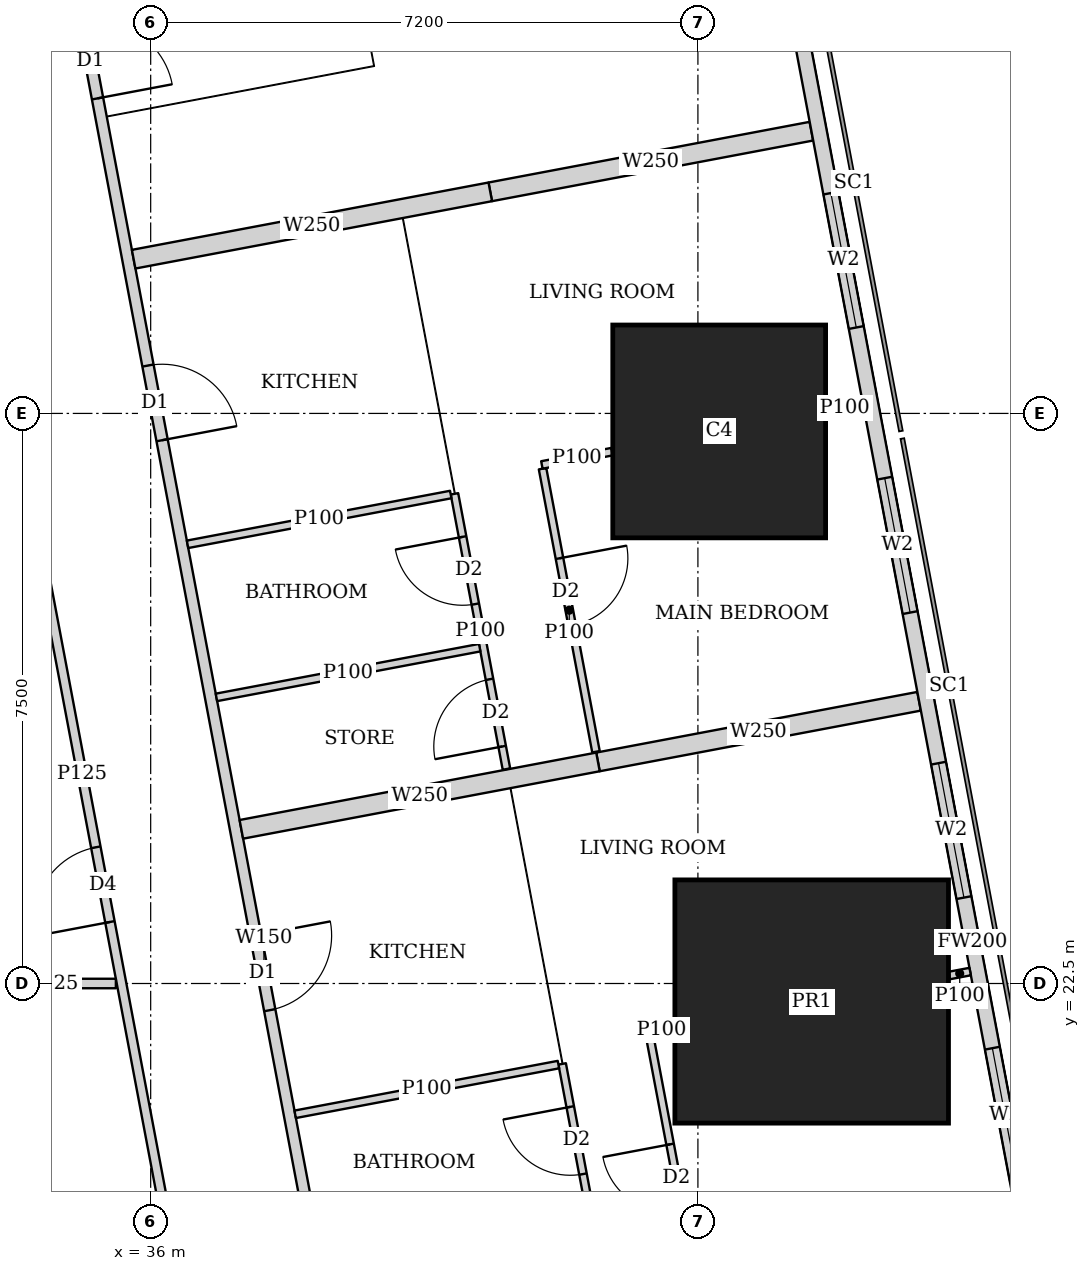
"""IFC4 building model, lengths in metres.
Left out: names, types, materials, properties, quantities, classifications, styles, units other than length and angle.
Written with IfcOpenShell. Run it as: python <this file> out.ifc"""

import sys

from ifc_helpers import new_model, si_unit, direction, frame, frame_2d, origin, origin_2d, place, context, subcontext, project, spatial, rectangle, extrude, element, fill, save


model = new_model("IFC4")
c1 = context("Model", 3, precision=1e-05, world=origin(), true_north=direction((0.0, 1.0)))
c2 = subcontext(c1, "Body", "Model", "MODEL_VIEW")
j1 = project(units=[si_unit("LENGTHUNIT", "METRE"), si_unit("PLANEANGLEUNIT", "RADIAN")], contexts=[c1])
p1 = place(None, origin())
s1 = spatial("IfcSite", under=j1, at=p1, CompositionType="ELEMENT")
p2 = place(p1, origin())
s2 = spatial("IfcBuilding", under=s1, at=p2, CompositionType="ELEMENT")
p3 = place(p2, frame((0.0, 0.0, 42.5)))
s3 = spatial("IfcBuildingStorey", under=s2, at=p3, CompositionType="ELEMENT", Elevation=42.5)
p4 = place(p3, frame((44.697, 22.263, 0.0), z_axis=(0.0, 0.0, 1.0), x_axis=(1.0, 0.0, 0.0)))
e1 = element("IfcColumn", 1, at=p4, inside=s3, PredefinedType="COLUMN", context=c2, shape_type="SweptSolid", body=[
    extrude(rectangle(XDim=3.6, YDim=3.2, at=origin_2d()), origin(), (0.0, 0.0, 1.0), 3.75),
])
p5 = place(p3, frame((43.48, 29.763, 0.0), z_axis=(0.0, 0.0, 1.0), x_axis=(1.0, 0.0, 0.0)))
e2 = element("IfcColumn", 2, at=p5, inside=s3, PredefinedType="COLUMN", context=c2, shape_type="SweptSolid", body=[
    extrude(rectangle(XDim=2.8, YDim=2.8, at=origin_2d()), origin(), (0.0, 0.0, 1.0), 3.75),
])
p6 = place(p3, frame((50.653, 2.703, 0.0), z_axis=(0.0, 0.0, 1.0), x_axis=(-0.185612026696, 0.982623109613, 0.0)))
e3 = element("IfcWall", 3, at=p6, inside=s3, PredefinedType="SOLIDWALL", context=c2, shape_type="SweptSolid", body=[
    extrude(rectangle(XDim=41.393, YDim=0.2, at=frame_2d((20.697, 0.0))), origin(), (0.0, 0.0, 1.0), 3.5),
])
p7 = place(p6, frame((1.633, 0.0, 0.9)))
e4 = element("IfcOpeningElement", 4, at=p7, cuts=e3, PredefinedType="OPENING", context=c2, shape_type="SweptSolid", body=[
    extrude(rectangle(XDim=1.8, YDim=1.5, at=frame_2d((0.9, 0.75))), frame((0.0, 0.11, 0.0), z_axis=(0.0, -1.0, 0.0), x_axis=(1.0, 0.0, 0.0)), (0.0, 0.0, 1.0), 0.22),
])
p8 = place(p6, frame((6.032, 0.0, 0.9)))
e5 = element("IfcOpeningElement", 5, at=p8, cuts=e3, PredefinedType="OPENING", context=c2, shape_type="SweptSolid", body=[
    extrude(rectangle(XDim=1.8, YDim=1.5, at=frame_2d((0.9, 0.75))), frame((0.0, 0.11, 0.0), z_axis=(0.0, -1.0, 0.0), x_axis=(1.0, 0.0, 0.0)), (0.0, 0.0, 1.0), 0.22),
])
p9 = place(p6, frame((9.848, 0.0, 0.9)))
e6 = element("IfcOpeningElement", 6, at=p9, cuts=e3, PredefinedType="OPENING", context=c2, shape_type="SweptSolid", body=[
    extrude(rectangle(XDim=1.8, YDim=1.5, at=frame_2d((0.9, 0.75))), frame((0.0, 0.11, 0.0), z_axis=(0.0, -1.0, 0.0), x_axis=(1.0, 0.0, 0.0)), (0.0, 0.0, 1.0), 0.22),
])
p10 = place(p6, frame((17.481, 0.0, 0.9)))
e7 = element("IfcOpeningElement", 7, at=p10, cuts=e3, PredefinedType="OPENING", context=c2, shape_type="SweptSolid", body=[
    extrude(rectangle(XDim=1.8, YDim=1.5, at=frame_2d((0.9, 0.75))), frame((0.0, 0.11, 0.0), z_axis=(0.0, -1.0, 0.0), x_axis=(1.0, 0.0, 0.0)), (0.0, 0.0, 1.0), 0.22),
])
p11 = place(p6, frame((21.297, 0.0, 0.9)))
e8 = element("IfcOpeningElement", 8, at=p11, cuts=e3, PredefinedType="OPENING", context=c2, shape_type="SweptSolid", body=[
    extrude(rectangle(XDim=1.8, YDim=1.5, at=frame_2d((0.9, 0.75))), frame((0.0, 0.11, 0.0), z_axis=(0.0, -1.0, 0.0), x_axis=(1.0, 0.0, 0.0)), (0.0, 0.0, 1.0), 0.22),
])
p12 = place(p6, frame((25.113, 0.0, 0.9)))
e9 = element("IfcOpeningElement", 9, at=p12, cuts=e3, PredefinedType="OPENING", context=c2, shape_type="SweptSolid", body=[
    extrude(rectangle(XDim=1.8, YDim=1.5, at=frame_2d((0.9, 0.75))), frame((0.0, 0.11, 0.0), z_axis=(0.0, -1.0, 0.0), x_axis=(1.0, 0.0, 0.0)), (0.0, 0.0, 1.0), 0.22),
])
p13 = place(p6, frame((28.93, 0.0, 0.9)))
e10 = element("IfcOpeningElement", 10, at=p13, cuts=e3, PredefinedType="OPENING", context=c2, shape_type="SweptSolid", body=[
    extrude(rectangle(XDim=1.8, YDim=1.5, at=frame_2d((0.9, 0.75))), frame((0.0, 0.11, 0.0), z_axis=(0.0, -1.0, 0.0), x_axis=(1.0, 0.0, 0.0)), (0.0, 0.0, 1.0), 0.22),
])
p14 = place(p6, frame((32.746, 0.0, 0.9)))
e11 = element("IfcOpeningElement", 11, at=p14, cuts=e3, PredefinedType="OPENING", context=c2, shape_type="SweptSolid", body=[
    extrude(rectangle(XDim=1.8, YDim=1.5, at=frame_2d((0.9, 0.75))), frame((0.0, 0.11, 0.0), z_axis=(0.0, -1.0, 0.0), x_axis=(1.0, 0.0, 0.0)), (0.0, 0.0, 1.0), 0.22),
])
p15 = place(p6, frame((36.481, 0.0, 0.9)))
e12 = element("IfcOpeningElement", 12, at=p15, cuts=e3, PredefinedType="OPENING", context=c2, shape_type="SweptSolid", body=[
    extrude(rectangle(XDim=1.8, YDim=1.5, at=frame_2d((0.9, 0.75))), frame((0.0, 0.11, 0.0), z_axis=(0.0, -1.0, 0.0), x_axis=(1.0, 0.0, 0.0)), (0.0, 0.0, 1.0), 0.22),
])
p16 = place(p3, frame((33.68, 42.723, 0.0), z_axis=(0.0, 0.0, 1.0), x_axis=(0.185624129307, -0.98262082342, 0.0)))
e13 = element("IfcWall", 13, at=p16, inside=s3, PredefinedType="SOLIDWALL", context=c2, shape_type="SweptSolid", body=[
    extrude(rectangle(XDim=41.051, YDim=0.15, at=frame_2d((20.526, 0.0))), origin(), (0.0, 0.0, 1.0), 2.5),
])
p17 = place(p16, frame((7.73, 0.0, 0.0)))
e14 = element("IfcOpeningElement", 14, at=p17, cuts=e13, PredefinedType="OPENING", context=c2, shape_type="SweptSolid", body=[
    extrude(rectangle(XDim=1.0, YDim=2.1, at=frame_2d((0.5, 1.05))), frame((0.0, 0.085, 0.0), z_axis=(0.0, -1.0, 0.0), x_axis=(1.0, 0.0, 0.0)), (0.0, 0.0, 1.0), 0.17),
])
p18 = place(p16, frame((12.307, 0.0, 0.0)))
e15 = element("IfcOpeningElement", 15, at=p18, cuts=e13, PredefinedType="OPENING", context=c2, shape_type="SweptSolid", body=[
    extrude(rectangle(XDim=1.0, YDim=2.1, at=frame_2d((0.5, 1.05))), frame((0.0, 0.085, 0.0), z_axis=(0.0, -1.0, 0.0), x_axis=(1.0, 0.0, 0.0)), (0.0, 0.0, 1.0), 0.17),
])
p19 = place(p16, frame((19.938, 0.0, 0.0)))
e16 = element("IfcOpeningElement", 16, at=p19, cuts=e13, PredefinedType="OPENING", context=c2, shape_type="SweptSolid", body=[
    extrude(rectangle(XDim=1.0, YDim=2.1, at=frame_2d((0.5, 1.05))), frame((0.0, 0.085, 0.0), z_axis=(0.0, -1.0, 0.0), x_axis=(1.0, 0.0, 0.0)), (0.0, 0.0, 1.0), 0.17),
])
p20 = place(p16, frame((32.193, 0.0, 0.0)))
e17 = element("IfcOpeningElement", 17, at=p20, cuts=e13, PredefinedType="OPENING", context=c2, shape_type="SweptSolid", body=[
    extrude(rectangle(XDim=1.0, YDim=2.1, at=frame_2d((0.5, 1.05))), frame((0.0, 0.085, 0.0), z_axis=(0.0, -1.0, 0.0), x_axis=(1.0, 0.0, 0.0)), (0.0, 0.0, 1.0), 0.17),
])
p21 = place(p3, frame((41.156, 29.273, 0.0), z_axis=(0.0, 0.0, 1.0), x_axis=(0.185474762472, -0.982649028131, 0.0)))
e18 = element("IfcWall", 18, at=p21, inside=s3, PredefinedType="PARTITIONING", context=c2, shape_type="SweptSolid", body=[
    extrude(rectangle(XDim=3.79, YDim=0.1, at=frame_2d((1.895, 0.0))), origin(), (0.0, 0.0, 1.0), 2.5),
])
p22 = place(p21, frame((1.2, 0.0, 0.0)))
e19 = element("IfcOpeningElement", 19, at=p22, cuts=e18, PredefinedType="OPENING", context=c2, shape_type="SweptSolid", body=[
    extrude(rectangle(XDim=0.9, YDim=2.1, at=frame_2d((0.45, 1.05))), frame((0.0, 0.06, 0.0), z_axis=(0.0, -1.0, 0.0), x_axis=(1.0, 0.0, 0.0)), (0.0, 0.0, 1.0), 0.12),
])
p23 = place(p3, frame((39.997, 28.942, 0.0), z_axis=(0.0, 0.0, 1.0), x_axis=(0.185580474845, -0.982629069057, 0.0)))
e20 = element("IfcWall", 20, at=p23, inside=s3, PredefinedType="PARTITIONING", context=c2, shape_type="SweptSolid", body=[
    extrude(rectangle(XDim=3.685, YDim=0.1, at=frame_2d((1.842, 0.0))), origin(), (0.0, 0.0, 1.0), 3.5),
])
p24 = place(p23, frame((0.576, 0.0, 0.0)))
e21 = element("IfcOpeningElement", 21, at=p24, cuts=e20, PredefinedType="OPENING", context=c2, shape_type="SweptSolid", body=[
    extrude(rectangle(XDim=0.9, YDim=2.1, at=frame_2d((0.45, 1.05))), frame((0.0, 0.06, 0.0), z_axis=(0.0, -1.0, 0.0), x_axis=(1.0, 0.0, 0.0)), (0.0, 0.0, 1.0), 0.12),
])
p25 = place(p23, frame((2.483, 0.0, 0.0)))
e22 = element("IfcOpeningElement", 22, at=p25, cuts=e20, PredefinedType="OPENING", context=c2, shape_type="SweptSolid", body=[
    extrude(rectangle(XDim=0.9, YDim=2.1, at=frame_2d((0.45, 1.05))), frame((0.0, 0.06, 0.0), z_axis=(0.0, -1.0, 0.0), x_axis=(1.0, 0.0, 0.0)), (0.0, 0.0, 1.0), 0.12),
])
p26 = place(p3, frame((45.372, 30.121, 0.0), z_axis=(0.0, 0.0, 1.0), x_axis=(-0.982629142467, -0.185580086147, 0.0)))
e23 = element("IfcWall", 23, at=p26, inside=s3, PredefinedType="PARTITIONING", context=c2, shape_type="SweptSolid", body=[
    extrude(rectangle(XDim=0.491, YDim=0.1, at=frame_2d((0.245, 0.0))), origin(), (0.0, 0.0, 1.0), 3.5),
])
p27 = place(p3, frame((42.07, 29.497, 0.0), z_axis=(0.0, 0.0, 1.0), x_axis=(-0.982490624992, -0.186312028067, 0.0)))
e24 = element("IfcWall", 24, at=p27, inside=s3, PredefinedType="PARTITIONING", context=c2, shape_type="SweptSolid", body=[
    extrude(rectangle(XDim=0.939, YDim=0.1, at=frame_2d((0.47, 0.0))), origin(), (0.0, 0.0, 1.0), 2.5),
])
p28 = place(p3, frame((39.948, 28.933, 0.0), z_axis=(0.0, 0.0, 1.0), x_axis=(-0.982576058723, -0.185860939478, 0.0)))
e25 = element("IfcWall", 25, at=p28, inside=s3, PredefinedType="PARTITIONING", context=c2, shape_type="SweptSolid", body=[
    extrude(rectangle(XDim=3.524, YDim=0.1, at=frame_2d((1.762, 0.0))), origin(), (0.0, 0.0, 1.0), 3.5),
])
p29 = place(p3, frame((40.329, 26.918, 0.0), z_axis=(0.0, 0.0, 1.0), x_axis=(-0.982638553676, -0.185530247748, 0.0)))
e26 = element("IfcWall", 26, at=p29, inside=s3, PredefinedType="PARTITIONING", context=c2, shape_type="SweptSolid", body=[
    extrude(rectangle(XDim=3.525, YDim=0.1, at=frame_2d((1.763, 0.0))), origin(), (0.0, 0.0, 1.0), 3.5),
])
p30 = place(p3, frame((44.693, 33.713, 0.0), z_axis=(0.0, 0.0, 1.0), x_axis=(-0.982633535512, -0.185556823879, 0.0)))
e27 = element("IfcWall", 27, at=p30, inside=s3, PredefinedType="SOLIDWALL", context=c2, shape_type="SweptSolid", body=[
    extrude(rectangle(XDim=4.3, YDim=0.25, at=frame_2d((2.15, 0.0))), origin(), (0.0, 0.0, 1.0), 2.05),
])
p31 = place(p3, frame((40.468, 32.915, 0.0), z_axis=(0.0, 0.0, 1.0), x_axis=(-0.982635807605, -0.185544791394, 0.0)))
e28 = element("IfcWall", 28, at=p31, inside=s3, PredefinedType="SOLIDWALL", context=c2, shape_type="SweptSolid", body=[
    extrude(rectangle(XDim=4.775, YDim=0.25, at=frame_2d((2.388, 0.0))), origin(), (0.0, 0.0, 1.0), 3.5),
])
p32 = place(p3, frame((42.565, 21.809, 0.0), z_axis=(0.0, 0.0, 1.0), x_axis=(0.185719768524, -0.982602751665, 0.0)))
e29 = element("IfcWall", 29, at=p32, inside=s3, PredefinedType="PARTITIONING", context=c2, shape_type="SweptSolid", body=[
    extrude(rectangle(XDim=6.004, YDim=0.1, at=frame_2d((3.002, 0.0))), origin(), (0.0, 0.0, 1.0), 2.5),
])
p33 = place(p32, frame((1.45, 0.0, 0.0)))
e30 = element("IfcOpeningElement", 30, at=p33, cuts=e29, PredefinedType="OPENING", context=c2, shape_type="SweptSolid", body=[
    extrude(rectangle(XDim=0.9, YDim=2.1, at=frame_2d((0.45, 1.05))), frame((0.0, 0.06, 0.0), z_axis=(0.0, -1.0, 0.0), x_axis=(1.0, 0.0, 0.0)), (0.0, 0.0, 1.0), 0.12),
])
p34 = place(p3, frame((41.414, 21.442, 0.0), z_axis=(0.0, 0.0, 1.0), x_axis=(0.185605379031, -0.982624365297, 0.0)))
e31 = element("IfcWall", 31, at=p34, inside=s3, PredefinedType="PARTITIONING", context=c2, shape_type="SweptSolid", body=[
    extrude(rectangle(XDim=5.63, YDim=0.1, at=frame_2d((2.815, 0.0))), origin(), (0.0, 0.0, 1.0), 3.5),
])
p35 = place(p34, frame((0.575, 0.0, 0.0)))
e32 = element("IfcOpeningElement", 32, at=p35, cuts=e31, PredefinedType="OPENING", context=c2, shape_type="SweptSolid", body=[
    extrude(rectangle(XDim=0.9, YDim=2.1, at=frame_2d((0.45, 1.05))), frame((0.0, 0.06, 0.0), z_axis=(0.0, -1.0, 0.0), x_axis=(1.0, 0.0, 0.0)), (0.0, 0.0, 1.0), 0.12),
])
p36 = place(p34, frame((4.58, 0.0, 0.0)))
e33 = element("IfcOpeningElement", 33, at=p36, cuts=e31, PredefinedType="OPENING", context=c2, shape_type="SweptSolid", body=[
    extrude(rectangle(XDim=0.9, YDim=2.1, at=frame_2d((0.45, 1.05))), frame((0.0, 0.06, 0.0), z_axis=(0.0, -1.0, 0.0), x_axis=(1.0, 0.0, 0.0)), (0.0, 0.0, 1.0), 0.12),
])
p37 = place(p34, frame((2.483, 0.0, 0.0)))
e34 = element("IfcOpeningElement", 34, at=p37, cuts=e31, PredefinedType="OPENING", context=c2, shape_type="SweptSolid", body=[
    extrude(rectangle(XDim=0.9, YDim=2.1, at=frame_2d((0.45, 1.05))), frame((0.0, 0.06, 0.0), z_axis=(0.0, -1.0, 0.0), x_axis=(1.0, 0.0, 0.0)), (0.0, 0.0, 1.0), 0.12),
])
p38 = place(p3, frame((46.782, 22.657, 0.0), z_axis=(0.0, 0.0, 1.0), x_axis=(-0.982574553168, -0.185868898601, 0.0)))
e35 = element("IfcWall", 35, at=p38, inside=s3, PredefinedType="PARTITIONING", context=c2, shape_type="SweptSolid", body=[
    extrude(rectangle(XDim=0.28, YDim=0.1, at=frame_2d((0.14, 0.0))), origin(), (0.0, 0.0, 1.0), 3.5),
])
p39 = place(p3, frame((42.887, 21.921, 0.0), z_axis=(0.0, 0.0, 1.0), x_axis=(-0.982274918032, -0.187445953293, 0.0)))
e36 = element("IfcWall", 36, at=p39, inside=s3, PredefinedType="PARTITIONING", context=c2, shape_type="SweptSolid", body=[
    extrude(rectangle(XDim=0.336, YDim=0.1, at=frame_2d((0.168, 0.0))), origin(), (0.0, 0.0, 1.0), 2.5),
])
p40 = place(p3, frame((41.365, 21.433, 0.0), z_axis=(0.0, 0.0, 1.0), x_axis=(-0.982638553676, -0.185530247748, 0.0)))
e37 = element("IfcWall", 37, at=p40, inside=s3, PredefinedType="PARTITIONING", context=c2, shape_type="SweptSolid", body=[
    extrude(rectangle(XDim=3.525, YDim=0.1, at=frame_2d((1.763, 0.0))), origin(), (0.0, 0.0, 1.0), 3.5),
])
p41 = place(p3, frame((46.11, 26.213, 0.0), z_axis=(0.0, 0.0, 1.0), x_axis=(-0.982633535512, -0.185556823879, 0.0)))
e38 = element("IfcWall", 38, at=p41, inside=s3, PredefinedType="SOLIDWALL", context=c2, shape_type="SweptSolid", body=[
    extrude(rectangle(XDim=4.3, YDim=0.25, at=frame_2d((2.15, 0.0))), origin(), (0.0, 0.0, 1.0), 2.05),
])
p42 = place(p3, frame((41.885, 25.415, 0.0), z_axis=(0.0, 0.0, 1.0), x_axis=(-0.982596737686, -0.185751584349, 0.0)))
e39 = element("IfcWall", 39, at=p42, inside=s3, PredefinedType="SOLIDWALL", context=c2, shape_type="SweptSolid", body=[
    extrude(rectangle(XDim=4.775, YDim=0.25, at=frame_2d((2.387, 0.0))), origin(), (0.0, 0.0, 1.0), 3.5),
])
p43 = place(p3, frame((36.861, 15.913, 0.0), z_axis=(0.0, 0.0, 1.0), x_axis=(-0.185588307143, 0.982627589808, 0.0)))
e40 = element("IfcWall", 40, at=p43, inside=s3, PredefinedType="PARTITIONING", context=c2, shape_type="SweptSolid", body=[
    extrude(rectangle(XDim=19.005, YDim=0.125, at=frame_2d((9.502, 0.0))), origin(), (0.0, 0.0, 1.0), 2.5),
])
p44 = place(p43, frame((0.25, 0.0, 0.0)))
e41 = element("IfcOpeningElement", 41, at=p44, cuts=e40, PredefinedType="OPENING", context=c2, shape_type="SweptSolid", body=[
    extrude(rectangle(XDim=1.0, YDim=2.1, at=frame_2d((0.5, 1.05))), frame((0.0, 0.073, 0.0), z_axis=(0.0, -1.0, 0.0), x_axis=(1.0, 0.0, 0.0)), (0.0, 0.0, 1.0), 0.145),
])
p45 = place(p43, frame((7.527, 0.0, 0.0)))
e42 = element("IfcOpeningElement", 42, at=p45, cuts=e40, PredefinedType="OPENING", context=c2, shape_type="SweptSolid", body=[
    extrude(rectangle(XDim=1.0, YDim=2.1, at=frame_2d((0.5, 1.05))), frame((0.0, 0.073, 0.0), z_axis=(0.0, -1.0, 0.0), x_axis=(1.0, 0.0, 0.0)), (0.0, 0.0, 1.0), 0.145),
])
p46 = place(p43, frame((15.5, 0.0, 0.0)))
e43 = element("IfcOpeningElement", 43, at=p46, cuts=e40, PredefinedType="OPENING", context=c2, shape_type="SweptSolid", body=[
    extrude(rectangle(XDim=1.0, YDim=2.1, at=frame_2d((0.5, 1.05))), frame((0.0, 0.073, 0.0), z_axis=(0.0, -1.0, 0.0), x_axis=(1.0, 0.0, 0.0)), (0.0, 0.0, 1.0), 0.145),
])
p47 = place(p3, frame((33.901, 22.5, 0.0), z_axis=(0.0, 0.0, 1.0), x_axis=(1.0, 0.0, 0.0)))
e44 = element("IfcWall", 44, at=p47, inside=s3, PredefinedType="PARTITIONING", context=c2, shape_type="SweptSolid", body=[
    extrude(rectangle(XDim=1.641, YDim=0.125, at=frame_2d((0.821, 0.0))), origin(), (0.0, 0.0, 1.0), 2.5),
])
p48 = place(p10, origin())
e45 = element("IfcWindow", 45, at=p48, inside=s3, PartitioningType="SINGLE_PANEL", PredefinedType="WINDOW", context=c2, shape_type="SweptSolid", body=[
    extrude(rectangle(XDim=1.8, YDim=1.5, at=frame_2d((0.9, 0.75))), frame((0.0, 0.03, 0.0), z_axis=(0.0, -1.0, 0.0), x_axis=(1.0, 0.0, 0.0)), (0.0, 0.0, 1.0), 0.06),
])
fill(e7, e45)
p49 = place(p11, origin())
e46 = element("IfcWindow", 46, at=p49, inside=s3, PartitioningType="SINGLE_PANEL", PredefinedType="WINDOW", context=c2, shape_type="SweptSolid", body=[
    extrude(rectangle(XDim=1.8, YDim=1.5, at=frame_2d((0.9, 0.75))), frame((0.0, 0.03, 0.0), z_axis=(0.0, -1.0, 0.0), x_axis=(1.0, 0.0, 0.0)), (0.0, 0.0, 1.0), 0.06),
])
fill(e8, e46)
p50 = place(p12, origin())
e47 = element("IfcWindow", 47, at=p50, inside=s3, PartitioningType="SINGLE_PANEL", PredefinedType="WINDOW", context=c2, shape_type="SweptSolid", body=[
    extrude(rectangle(XDim=1.8, YDim=1.5, at=frame_2d((0.9, 0.75))), frame((0.0, 0.03, 0.0), z_axis=(0.0, -1.0, 0.0), x_axis=(1.0, 0.0, 0.0)), (0.0, 0.0, 1.0), 0.06),
])
fill(e9, e47)
p51 = place(p13, origin())
e48 = element("IfcWindow", 48, at=p51, inside=s3, PartitioningType="SINGLE_PANEL", PredefinedType="WINDOW", context=c2, shape_type="SweptSolid", body=[
    extrude(rectangle(XDim=1.8, YDim=1.5, at=frame_2d((0.9, 0.75))), frame((0.0, 0.03, 0.0), z_axis=(0.0, -1.0, 0.0), x_axis=(1.0, 0.0, 0.0)), (0.0, 0.0, 1.0), 0.06),
])
fill(e10, e48)
p52 = place(p17, origin())
e49 = element("IfcDoor", 49, at=p52, inside=s3, OperationType="SINGLE_SWING_RIGHT", PredefinedType="DOOR", context=c2, shape_type="SweptSolid", body=[
    extrude(rectangle(XDim=1.0, YDim=2.1, at=frame_2d((0.5, 1.05))), frame((0.0, 0.025, 0.0), z_axis=(0.0, -1.0, 0.0), x_axis=(1.0, 0.0, 0.0)), (0.0, 0.0, 1.0), 0.05),
])
fill(e14, e49)
p53 = place(p22, origin())
e50 = element("IfcDoor", 50, at=p53, inside=s3, OperationType="SINGLE_SWING_LEFT", PredefinedType="DOOR", context=c2, shape_type="SweptSolid", body=[
    extrude(rectangle(XDim=0.9, YDim=2.1, at=frame_2d((0.45, 1.05))), frame((0.0, 0.025, 0.0), z_axis=(0.0, -1.0, 0.0), x_axis=(1.0, 0.0, 0.0)), (0.0, 0.0, 1.0), 0.05),
])
fill(e19, e50)
p54 = place(p24, origin())
e51 = element("IfcDoor", 51, at=p54, inside=s3, OperationType="SINGLE_SWING_RIGHT", PredefinedType="DOOR", context=c2, shape_type="SweptSolid", body=[
    extrude(rectangle(XDim=0.9, YDim=2.1, at=frame_2d((0.45, 1.05))), frame((0.0, 0.025, 0.0), z_axis=(0.0, -1.0, 0.0), x_axis=(1.0, 0.0, 0.0)), (0.0, 0.0, 1.0), 0.05),
])
fill(e21, e51)
p55 = place(p25, origin())
e52 = element("IfcDoor", 52, at=p55, inside=s3, OperationType="SINGLE_SWING_LEFT", PredefinedType="DOOR", context=c2, shape_type="SweptSolid", body=[
    extrude(rectangle(XDim=0.9, YDim=2.1, at=frame_2d((0.45, 1.05))), frame((0.0, 0.025, 0.0), z_axis=(0.0, -1.0, 0.0), x_axis=(1.0, 0.0, 0.0)), (0.0, 0.0, 1.0), 0.05),
])
fill(e22, e52)
p56 = place(p18, origin())
e53 = element("IfcDoor", 53, at=p56, inside=s3, OperationType="SINGLE_SWING_RIGHT", PredefinedType="DOOR", context=c2, shape_type="SweptSolid", body=[
    extrude(rectangle(XDim=1.0, YDim=2.1, at=frame_2d((0.5, 1.05))), frame((0.0, 0.025, 0.0), z_axis=(0.0, -1.0, 0.0), x_axis=(1.0, 0.0, 0.0)), (0.0, 0.0, 1.0), 0.05),
])
fill(e15, e53)
p57 = place(p33, origin())
e54 = element("IfcDoor", 54, at=p57, inside=s3, OperationType="SINGLE_SWING_RIGHT", PredefinedType="DOOR", context=c2, shape_type="SweptSolid", body=[
    extrude(rectangle(XDim=0.9, YDim=2.1, at=frame_2d((0.45, 1.05))), frame((0.0, 0.025, 0.0), z_axis=(0.0, -1.0, 0.0), x_axis=(1.0, 0.0, 0.0)), (0.0, 0.0, 1.0), 0.05),
])
fill(e30, e54)
p58 = place(p35, origin())
e55 = element("IfcDoor", 55, at=p58, inside=s3, OperationType="SINGLE_SWING_RIGHT", PredefinedType="DOOR", context=c2, shape_type="SweptSolid", body=[
    extrude(rectangle(XDim=0.9, YDim=2.1, at=frame_2d((0.45, 1.05))), frame((0.0, 0.025, 0.0), z_axis=(0.0, -1.0, 0.0), x_axis=(1.0, 0.0, 0.0)), (0.0, 0.0, 1.0), 0.05),
])
fill(e32, e55)
p59 = place(p19, origin())
e56 = element("IfcDoor", 56, at=p59, inside=s3, OperationType="SINGLE_SWING_LEFT", PredefinedType="DOOR", context=c2, shape_type="SweptSolid", body=[
    extrude(rectangle(XDim=1.0, YDim=2.1, at=frame_2d((0.5, 1.05))), frame((0.0, 0.025, 0.0), z_axis=(0.0, -1.0, 0.0), x_axis=(1.0, 0.0, 0.0)), (0.0, 0.0, 1.0), 0.05),
])
fill(e16, e56)
p60 = place(p45, origin())
e57 = element("IfcDoor", 57, at=p60, inside=s3, OperationType="SINGLE_SWING_LEFT", PredefinedType="DOOR", context=c2, shape_type="SweptSolid", body=[
    extrude(rectangle(XDim=1.0, YDim=2.1, at=frame_2d((0.5, 1.05))), frame((0.0, 0.025, 0.0), z_axis=(0.0, -1.0, 0.0), x_axis=(1.0, 0.0, 0.0)), (0.0, 0.0, 1.0), 0.05),
])
fill(e42, e57)
save(model, sys.argv[1])
